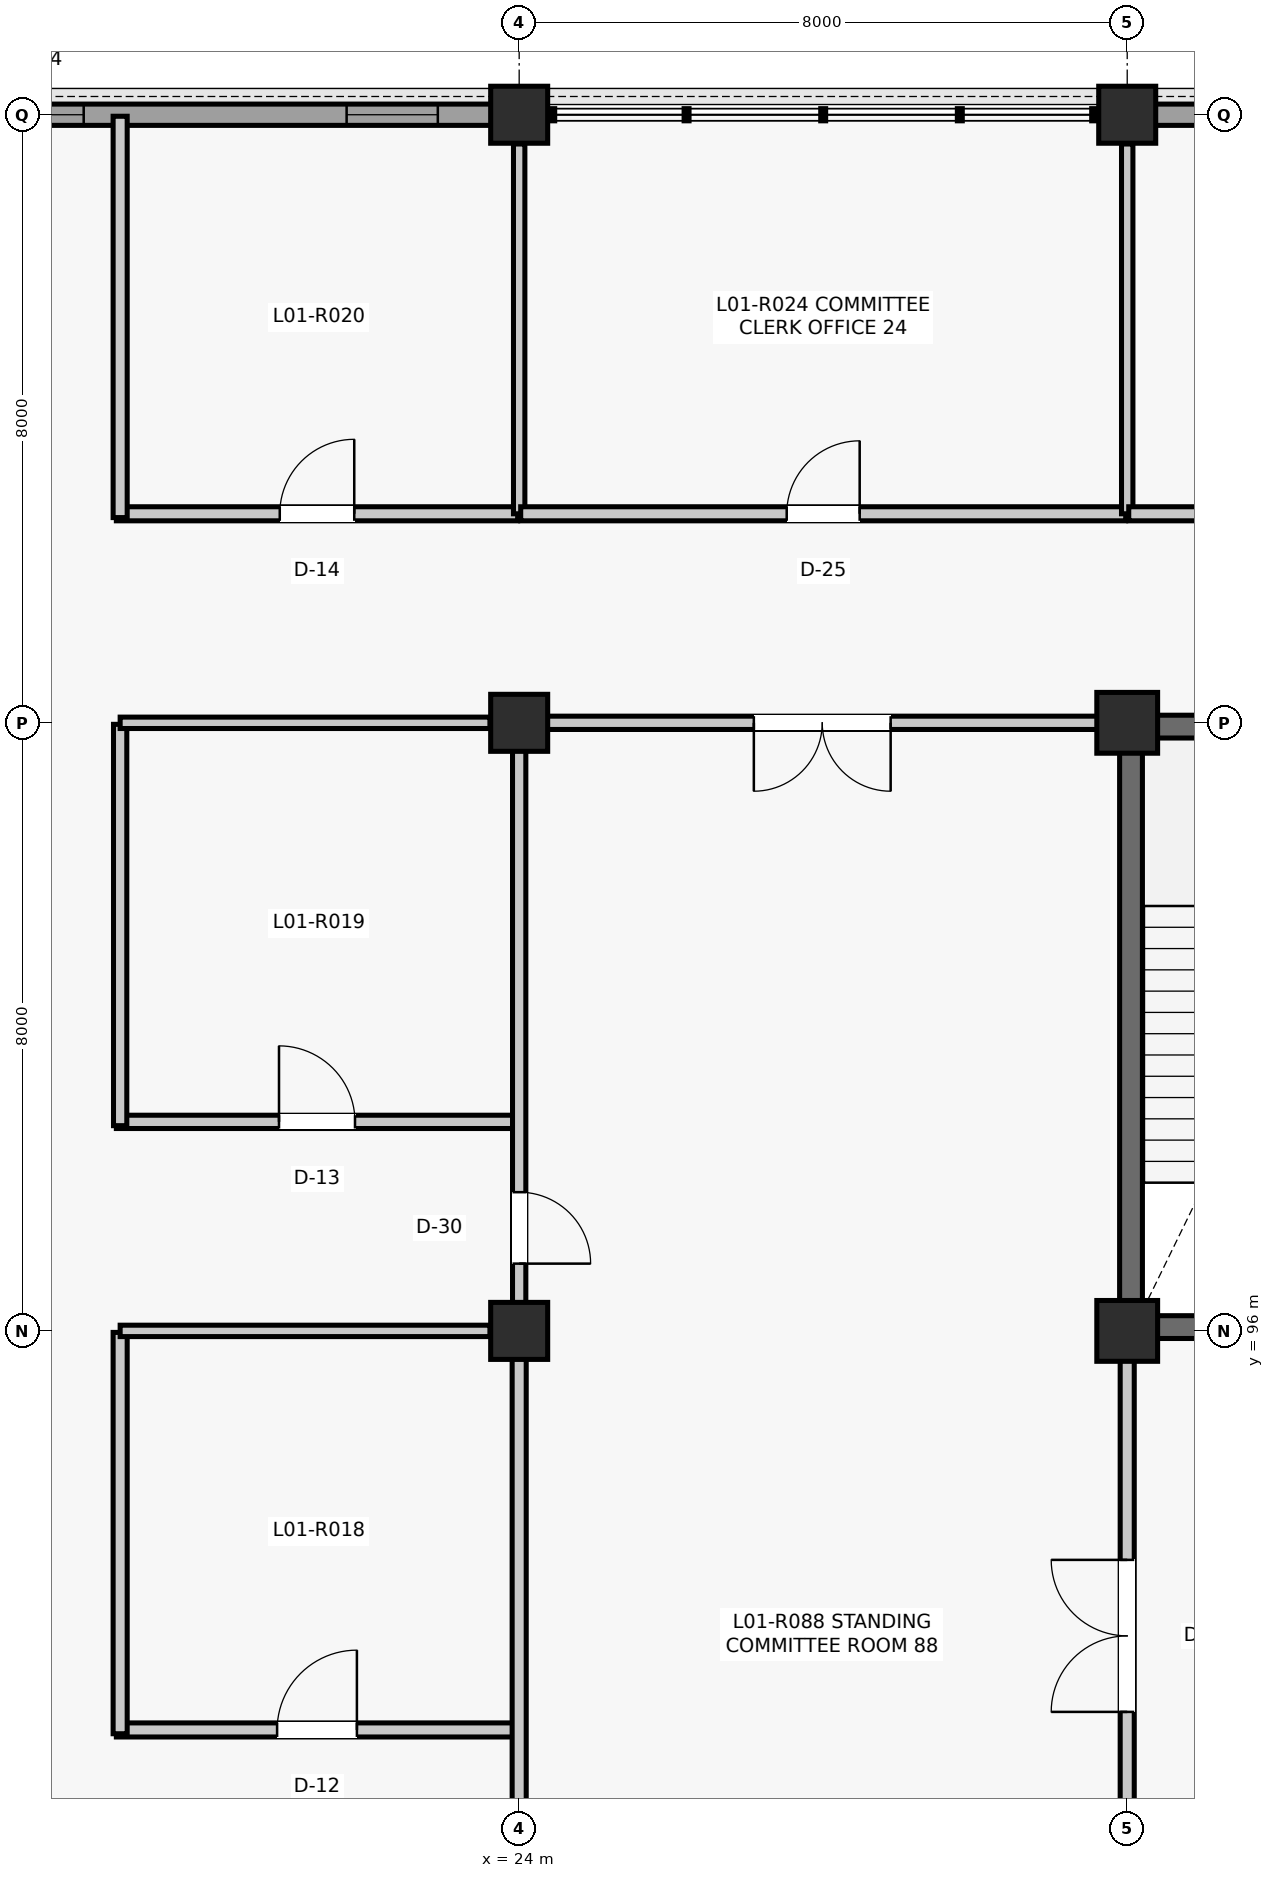
"""IFC4 building model, lengths in metres.
Left out: names, types, materials, properties, quantities, classifications, styles, units other than length and angle.
Written with IfcOpenShell. Run it as: python <this file> out.ifc"""

import sys

from ifc_helpers import new_model, si_unit, direction, frame, frame_2d, origin, origin_2d, place, context, subcontext, project, spatial, rectangle, extrude, element, fill, save


model = new_model("IFC4")
c1 = context("Model", 3, precision=1e-05, world=origin(), true_north=direction((0.0, 1.0)))
c2 = subcontext(c1, "Body", "Model", "MODEL_VIEW")
j1 = project(units=[si_unit("LENGTHUNIT", "METRE"), si_unit("PLANEANGLEUNIT", "RADIAN")], contexts=[c1])
p1 = place(None, origin())
s1 = spatial("IfcSite", under=j1, at=p1, CompositionType="ELEMENT")
p2 = place(p1, origin())
s2 = spatial("IfcBuilding", under=s1, at=p2, CompositionType="ELEMENT")
p3 = place(p2, frame((0.0, 0.0, 5.28)))
s3 = spatial("IfcBuildingStorey", under=s2, at=p3, CompositionType="ELEMENT", Elevation=5.28)
for number, where, z_axis, x_axis in (
    (1, (24.0, 96.0, 0.0), (0.0, 0.0, 1.0), (1.0, 0.0, 0.0)),
    (2, (24.0, 104.0, 0.0), (0.0, 0.0, 1.0), (1.0, 0.0, 0.0)),
    (3, (24.0, 112.0, 0.0), (0.0, 0.0, 1.0), (1.0, 0.0, 0.0)),
):
    element("IfcColumn", number, at=place(p3, frame(where, z_axis=z_axis, x_axis=x_axis)), inside=s3, PredefinedType="COLUMN", context=c2, shape_type="SweptSolid", body=[
        extrude(rectangle(XDim=0.75, YDim=0.75, at=origin_2d()), origin(), (0.0, 0.0, 1.0), 4.62),
    ])
for number, where, z_axis, x_axis in (
    (4, (32.0, 96.0, 0.0), (0.0, 0.0, 1.0), (1.0, 0.0, 0.0)),
    (5, (32.0, 104.0, 0.0), (0.0, 0.0, 1.0), (1.0, 0.0, 0.0)),
):
    element("IfcColumn", number, at=place(p3, frame(where, z_axis=z_axis, x_axis=x_axis)), inside=s3, PredefinedType="COLUMN", context=c2, shape_type="SweptSolid", body=[
        extrude(rectangle(XDim=0.8, YDim=0.8, at=origin_2d()), origin(), (0.0, 0.0, 1.0), 4.62),
    ])
p4 = place(p3, frame((32.0, 112.0, 0.0), z_axis=(0.0, 0.0, 1.0), x_axis=(1.0, 0.0, 0.0)))
e6 = element("IfcColumn", 6, at=p4, inside=s3, PredefinedType="COLUMN", context=c2, shape_type="SweptSolid", body=[
    extrude(rectangle(XDim=0.75, YDim=0.75, at=origin_2d()), origin(), (0.0, 0.0, 1.0), 4.62),
])
p5 = place(p3, frame((16.36, 112.0, 0.0), z_axis=(0.0, 0.0, 1.0), x_axis=(1.0, 0.0, 0.0)))
e7 = element("IfcWall", 7, at=p5, inside=s3, PredefinedType="SOLIDWALL", context=c2, shape_type="SweptSolid", body=[
    extrude(rectangle(XDim=7.28, YDim=0.28, at=frame_2d((3.64, 0.0))), origin(), (0.0, 0.0, 1.0), 3.974),
])
p6 = place(p5, frame((0.71, 0.0, 0.95)))
e8 = element("IfcOpeningElement", 8, at=p6, cuts=e7, PredefinedType="OPENING", context=c2, shape_type="SweptSolid", body=[
    extrude(rectangle(XDim=1.2, YDim=1.8, at=frame_2d((0.6, 0.9))), frame((0.0, 0.15, 0.0), z_axis=(0.0, -1.0, 0.0), x_axis=(1.0, 0.0, 0.0)), (0.0, 0.0, 1.0), 0.3),
])
p7 = place(p5, frame((5.37, 0.0, 0.95)))
e9 = element("IfcOpeningElement", 9, at=p7, cuts=e7, PredefinedType="OPENING", context=c2, shape_type="SweptSolid", body=[
    extrude(rectangle(XDim=1.2, YDim=1.8, at=frame_2d((0.6, 0.9))), frame((0.0, 0.15, 0.0), z_axis=(0.0, -1.0, 0.0), x_axis=(1.0, 0.0, 0.0)), (0.0, 0.0, 1.0), 0.3),
])
p8 = place(p3, frame((32.36, 112.0, 0.0), z_axis=(0.0, 0.0, 1.0), x_axis=(1.0, 0.0, 0.0)))
e10 = element("IfcWall", 10, at=p8, inside=s3, PredefinedType="SOLIDWALL", context=c2, shape_type="SweptSolid", body=[
    extrude(rectangle(XDim=7.28, YDim=0.28, at=frame_2d((3.64, 0.0))), origin(), (0.0, 0.0, 1.0), 4.022),
])
p9 = place(p8, frame((2.59, 0.0, 0.9)))
e11 = element("IfcOpeningElement", 11, at=p9, cuts=e10, PredefinedType="OPENING", context=c2, shape_type="SweptSolid", body=[
    extrude(rectangle(XDim=2.1, YDim=2.4, at=frame_2d((1.05, 1.2))), frame((0.0, 0.15, 0.0), z_axis=(0.0, -1.0, 0.0), x_axis=(1.0, 0.0, 0.0)), (0.0, 0.0, 1.0), 0.3),
])
for number, where, z_axis, x_axis in (
    (12, (32.05, 96.29, 0.0), (0.0, 0.0, 1.0), (0.0, 1.0, 0.0)),
    (13, (32.29, 103.95, 0.0), (0.0, 0.0, 1.0), (1.0, 0.0, 0.0)),
):
    element("IfcWall", number, at=place(p3, frame(where, z_axis=z_axis, x_axis=x_axis)), inside=s3, PredefinedType="SHEAR", context=c2, shape_type="SweptSolid", body=[
        extrude(rectangle(XDim=7.42, YDim=0.3, at=frame_2d((3.71, 0.0))), origin(), (0.0, 0.0, 1.0), 4.335),
    ])
p10 = place(p3, frame((32.29, 96.05, 0.0), z_axis=(0.0, 0.0, 1.0), x_axis=(1.0, 0.0, 0.0)))
e14 = element("IfcWall", 14, at=p10, inside=s3, PredefinedType="SHEAR", context=c2, shape_type="SweptSolid", body=[
    extrude(rectangle(XDim=3.86, YDim=0.3, at=frame_2d((1.93, 0.0))), origin(), (0.0, 0.0, 1.0), 4.335),
])
p11 = place(p3, frame((18.7, 90.75, 0.0), z_axis=(0.0, 0.0, 1.0), x_axis=(1.0, 0.0, 0.0)))
e15 = element("IfcWall", 15, at=p11, inside=s3, PredefinedType="PARTITIONING", context=c2, shape_type="SweptSolid", body=[
    extrude(rectangle(XDim=5.28, YDim=0.185, at=frame_2d((2.64, 0.0))), origin(), (0.0, 0.0, 1.0), 3.781),
])
p12 = place(p11, frame((2.115, 0.0, 0.0)))
e16 = element("IfcOpeningElement", 16, at=p12, cuts=e15, PredefinedType="OPENING", context=c2, shape_type="SweptSolid", body=[
    extrude(rectangle(XDim=1.05, YDim=2.15, at=frame_2d((0.525, 1.075))), frame((0.0, 0.103, 0.0), z_axis=(0.0, -1.0, 0.0), x_axis=(1.0, 0.0, 0.0)), (0.0, 0.0, 1.0), 0.205),
])
p13 = place(p3, frame((18.75, 90.7, 0.0), z_axis=(0.0, 0.0, 1.0), x_axis=(0.0, 1.0, 0.0)))
e17 = element("IfcWall", 17, at=p13, inside=s3, PredefinedType="PARTITIONING", context=c2, shape_type="SweptSolid", body=[
    extrude(rectangle(XDim=5.28, YDim=0.185, at=frame_2d((2.64, 0.0))), origin(), (0.0, 0.0, 1.0), 3.771),
])
p14 = place(p3, frame((18.75, 96.0, 0.0), z_axis=(0.0, 0.0, 1.0), x_axis=(1.0, 0.0, 0.0)))
e18 = element("IfcWall", 18, at=p14, inside=s3, PredefinedType="PARTITIONING", context=c2, shape_type="SweptSolid", body=[
    extrude(rectangle(XDim=4.865, YDim=0.15, at=frame_2d((2.433, 0.0))), origin(), (0.0, 0.0, 1.0), 3.771),
])
p15 = place(p3, frame((18.7, 98.75, 0.0), z_axis=(0.0, 0.0, 1.0), x_axis=(1.0, 0.0, 0.0)))
e19 = element("IfcWall", 19, at=p15, inside=s3, PredefinedType="PARTITIONING", context=c2, shape_type="SweptSolid", body=[
    extrude(rectangle(XDim=5.28, YDim=0.175, at=frame_2d((2.64, 0.0))), origin(), (0.0, 0.0, 1.0), 3.851),
])
p16 = place(p15, frame((2.14, 0.0, 0.0)))
e20 = element("IfcOpeningElement", 20, at=p16, cuts=e19, PredefinedType="OPENING", context=c2, shape_type="SweptSolid", body=[
    extrude(rectangle(XDim=1.0, YDim=2.15, at=frame_2d((0.5, 1.075))), frame((0.0, 0.097, 0.0), z_axis=(0.0, -1.0, 0.0), x_axis=(1.0, 0.0, 0.0)), (0.0, 0.0, 1.0), 0.195),
])
p17 = place(p3, frame((18.75, 98.7, 0.0), z_axis=(0.0, 0.0, 1.0), x_axis=(0.0, 1.0, 0.0)))
e21 = element("IfcWall", 21, at=p17, inside=s3, PredefinedType="PARTITIONING", context=c2, shape_type="SweptSolid", body=[
    extrude(rectangle(XDim=5.28, YDim=0.175, at=frame_2d((2.64, 0.0))), origin(), (0.0, 0.0, 1.0), 3.781),
])
p18 = place(p3, frame((18.75, 104.0, 0.0), z_axis=(0.0, 0.0, 1.0), x_axis=(1.0, 0.0, 0.0)))
e22 = element("IfcWall", 22, at=p18, inside=s3, PredefinedType="PARTITIONING", context=c2, shape_type="SweptSolid", body=[
    extrude(rectangle(XDim=4.865, YDim=0.15, at=frame_2d((2.433, 0.0))), origin(), (0.0, 0.0, 1.0), 3.781),
])
p19 = place(p3, frame((18.7, 106.75, 0.0), z_axis=(0.0, 0.0, 1.0), x_axis=(1.0, 0.0, 0.0)))
e23 = element("IfcWall", 23, at=p19, inside=s3, PredefinedType="PARTITIONING", context=c2, shape_type="SweptSolid", body=[
    extrude(rectangle(XDim=5.28, YDim=0.185, at=frame_2d((2.64, 0.0))), origin(), (0.0, 0.0, 1.0), 3.787),
])
p20 = place(p19, frame((2.15, 0.0, 0.0)))
e24 = element("IfcOpeningElement", 24, at=p20, cuts=e23, PredefinedType="OPENING", context=c2, shape_type="SweptSolid", body=[
    extrude(rectangle(XDim=0.98, YDim=2.15, at=frame_2d((0.49, 1.075))), frame((0.0, 0.103, 0.0), z_axis=(0.0, -1.0, 0.0), x_axis=(1.0, 0.0, 0.0)), (0.0, 0.0, 1.0), 0.205),
])
p21 = place(p3, frame((18.75, 106.7, 0.0), z_axis=(0.0, 0.0, 1.0), x_axis=(0.0, 1.0, 0.0)))
e25 = element("IfcWall", 25, at=p21, inside=s3, PredefinedType="PARTITIONING", context=c2, shape_type="SweptSolid", body=[
    extrude(rectangle(XDim=5.28, YDim=0.185, at=frame_2d((2.64, 0.0))), origin(), (0.0, 0.0, 1.0), 3.967),
])
p22 = place(p3, frame((24.0, 106.75, 0.0), z_axis=(0.0, 0.0, 1.0), x_axis=(0.0, 1.0, 0.0)))
e26 = element("IfcWall", 26, at=p22, inside=s3, PredefinedType="PARTITIONING", context=c2, shape_type="SweptSolid", body=[
    extrude(rectangle(XDim=4.865, YDim=0.15, at=frame_2d((2.433, 0.0))), origin(), (0.0, 0.0, 1.0), 3.787),
])
p23 = place(p3, frame((24.02, 106.75, 0.0), z_axis=(0.0, 0.0, 1.0), x_axis=(1.0, 0.0, 0.0)))
e27 = element("IfcWall", 27, at=p23, inside=s3, PredefinedType="PARTITIONING", context=c2, shape_type="SweptSolid", body=[
    extrude(rectangle(XDim=7.96, YDim=0.185, at=frame_2d((3.98, 0.0))), origin(), (0.0, 0.0, 1.0), 3.787),
])
p24 = place(p23, frame((3.5, 0.0, 0.0)))
e28 = element("IfcOpeningElement", 28, at=p24, cuts=e27, PredefinedType="OPENING", context=c2, shape_type="SweptSolid", body=[
    extrude(rectangle(XDim=0.96, YDim=2.14, at=frame_2d((0.48, 1.07))), frame((0.0, 0.103, 0.0), z_axis=(0.0, -1.0, 0.0), x_axis=(1.0, 0.0, 0.0)), (0.0, 0.0, 1.0), 0.205),
])
p25 = place(p3, frame((32.0, 106.75, 0.0), z_axis=(0.0, 0.0, 1.0), x_axis=(0.0, 1.0, 0.0)))
e29 = element("IfcWall", 29, at=p25, inside=s3, PredefinedType="PARTITIONING", context=c2, shape_type="SweptSolid", body=[
    extrude(rectangle(XDim=4.865, YDim=0.15, at=frame_2d((2.433, 0.0))), origin(), (0.0, 0.0, 1.0), 3.902),
])
p26 = place(p3, frame((32.02, 106.75, 0.0), z_axis=(0.0, 0.0, 1.0), x_axis=(1.0, 0.0, 0.0)))
e30 = element("IfcWall", 30, at=p26, inside=s3, PredefinedType="PARTITIONING", context=c2, shape_type="SweptSolid", body=[
    extrude(rectangle(XDim=7.96, YDim=0.185, at=frame_2d((3.98, 0.0))), origin(), (0.0, 0.0, 1.0), 3.781),
])
p27 = place(p26, frame((3.49, 0.0, 0.0)))
e31 = element("IfcOpeningElement", 31, at=p27, cuts=e30, PredefinedType="OPENING", context=c2, shape_type="SweptSolid", body=[
    extrude(rectangle(XDim=0.98, YDim=2.15, at=frame_2d((0.49, 1.075))), frame((0.0, 0.103, 0.0), z_axis=(0.0, -1.0, 0.0), x_axis=(1.0, 0.0, 0.0)), (0.0, 0.0, 1.0), 0.205),
])
p28 = place(p3, frame((24.0, 88.365, 0.0), z_axis=(0.0, 0.0, 1.0), x_axis=(0.0, 1.0, 0.0)))
e32 = element("IfcWall", 32, at=p28, inside=s3, PredefinedType="PARTITIONING", context=c2, shape_type="SweptSolid", body=[
    extrude(rectangle(XDim=7.27, YDim=0.185, at=frame_2d((3.635, 0.0))), origin(), (0.0, 0.0, 1.0), 3.781),
])
p29 = place(p28, frame((0.52, 0.0, 0.0)))
e33 = element("IfcOpeningElement", 33, at=p29, cuts=e32, PredefinedType="OPENING", context=c2, shape_type="SweptSolid", body=[
    extrude(rectangle(XDim=0.94, YDim=2.12, at=frame_2d((0.47, 1.06))), frame((0.0, 0.103, 0.0), z_axis=(0.0, -1.0, 0.0), x_axis=(1.0, 0.0, 0.0)), (0.0, 0.0, 1.0), 0.205),
])
p30 = place(p3, frame((24.0, 96.365, 0.0), z_axis=(0.0, 0.0, 1.0), x_axis=(0.0, 1.0, 0.0)))
e34 = element("IfcWall", 34, at=p30, inside=s3, PredefinedType="PARTITIONING", context=c2, shape_type="SweptSolid", body=[
    extrude(rectangle(XDim=7.27, YDim=0.175, at=frame_2d((3.635, 0.0))), origin(), (0.0, 0.0, 1.0), 3.851),
])
p31 = place(p30, frame((0.52, 0.0, 0.0)))
e35 = element("IfcOpeningElement", 35, at=p31, cuts=e34, PredefinedType="OPENING", context=c2, shape_type="SweptSolid", body=[
    extrude(rectangle(XDim=0.94, YDim=2.12, at=frame_2d((0.47, 1.06))), frame((0.0, 0.097, 0.0), z_axis=(0.0, -1.0, 0.0), x_axis=(1.0, 0.0, 0.0)), (0.0, 0.0, 1.0), 0.195),
])
p32 = place(p3, frame((32.0, 88.365, 0.0), z_axis=(0.0, 0.0, 1.0), x_axis=(0.0, 1.0, 0.0)))
e36 = element("IfcWall", 36, at=p32, inside=s3, PredefinedType="PARTITIONING", context=c2, shape_type="SweptSolid", body=[
    extrude(rectangle(XDim=7.245, YDim=0.185, at=frame_2d((3.623, 0.0))), origin(), (0.0, 0.0, 1.0), 3.851),
])
p33 = place(p32, frame((2.623, 0.0, 0.0)))
e37 = element("IfcOpeningElement", 37, at=p33, cuts=e36, PredefinedType="OPENING", context=c2, shape_type="SweptSolid", body=[
    extrude(rectangle(XDim=2.0, YDim=2.4, at=frame_2d((1.0, 1.2))), frame((0.0, 0.103, 0.0), z_axis=(0.0, -1.0, 0.0), x_axis=(1.0, 0.0, 0.0)), (0.0, 0.0, 1.0), 0.205),
])
p34 = place(p3, frame((24.365, 104.0, 0.0), z_axis=(0.0, 0.0, 1.0), x_axis=(1.0, 0.0, 0.0)))
e38 = element("IfcWall", 38, at=p34, inside=s3, PredefinedType="PARTITIONING", context=c2, shape_type="SweptSolid", body=[
    extrude(rectangle(XDim=7.245, YDim=0.175, at=frame_2d((3.623, 0.0))), origin(), (0.0, 0.0, 1.0), 3.712),
])
p35 = place(p34, frame((2.722, 0.0, 0.0)))
e39 = element("IfcOpeningElement", 39, at=p35, cuts=e38, PredefinedType="OPENING", context=c2, shape_type="SweptSolid", body=[
    extrude(rectangle(XDim=1.8, YDim=2.35, at=frame_2d((0.9, 1.175))), frame((0.0, 0.097, 0.0), z_axis=(0.0, -1.0, 0.0), x_axis=(1.0, 0.0, 0.0)), (0.0, 0.0, 1.0), 0.195),
])
p36 = place(p6, origin())
e40 = element("IfcWindow", 40, at=p36, inside=s3, PartitioningType="SINGLE_PANEL", PredefinedType="WINDOW", context=c2, shape_type="SweptSolid", body=[
    extrude(rectangle(XDim=1.2, YDim=1.8, at=frame_2d((0.6, 0.9))), frame((0.0, 0.03, 0.0), z_axis=(0.0, -1.0, 0.0), x_axis=(1.0, 0.0, 0.0)), (0.0, 0.0, 1.0), 0.06),
])
fill(e8, e40)
p37 = place(p7, origin())
e41 = element("IfcWindow", 41, at=p37, inside=s3, PartitioningType="SINGLE_PANEL", PredefinedType="WINDOW", context=c2, shape_type="SweptSolid", body=[
    extrude(rectangle(XDim=1.2, YDim=1.8, at=frame_2d((0.6, 0.9))), frame((0.0, 0.03, 0.0), z_axis=(0.0, -1.0, 0.0), x_axis=(1.0, 0.0, 0.0)), (0.0, 0.0, 1.0), 0.06),
])
fill(e9, e41)
p38 = place(p12, origin())
e42 = element("IfcDoor", 42, at=p38, inside=s3, OperationType="SINGLE_SWING_RIGHT", PredefinedType="DOOR", context=c2, shape_type="SweptSolid", body=[
    extrude(rectangle(XDim=1.05, YDim=2.15, at=frame_2d((0.525, 1.075))), frame((0.0, 0.025, 0.0), z_axis=(0.0, -1.0, 0.0), x_axis=(1.0, 0.0, 0.0)), (0.0, 0.0, 1.0), 0.05),
])
fill(e16, e42)
p39 = place(p16, origin())
e43 = element("IfcDoor", 43, at=p39, inside=s3, OperationType="SINGLE_SWING_LEFT", PredefinedType="DOOR", context=c2, shape_type="SweptSolid", body=[
    extrude(rectangle(XDim=1.0, YDim=2.15, at=frame_2d((0.5, 1.075))), frame((0.0, 0.025, 0.0), z_axis=(0.0, -1.0, 0.0), x_axis=(1.0, 0.0, 0.0)), (0.0, 0.0, 1.0), 0.05),
])
fill(e20, e43)
p40 = place(p20, origin())
e44 = element("IfcDoor", 44, at=p40, inside=s3, OperationType="SINGLE_SWING_RIGHT", PredefinedType="DOOR", context=c2, shape_type="SweptSolid", body=[
    extrude(rectangle(XDim=0.98, YDim=2.15, at=frame_2d((0.49, 1.075))), frame((0.0, 0.025, 0.0), z_axis=(0.0, -1.0, 0.0), x_axis=(1.0, 0.0, 0.0)), (0.0, 0.0, 1.0), 0.05),
])
fill(e24, e44)
p41 = place(p24, origin())
e45 = element("IfcDoor", 45, at=p41, inside=s3, OperationType="SINGLE_SWING_RIGHT", PredefinedType="DOOR", context=c2, shape_type="SweptSolid", body=[
    extrude(rectangle(XDim=0.96, YDim=2.14, at=frame_2d((0.48, 1.07))), frame((0.0, 0.025, 0.0), z_axis=(0.0, -1.0, 0.0), x_axis=(1.0, 0.0, 0.0)), (0.0, 0.0, 1.0), 0.05),
])
fill(e28, e45)
p42 = place(p31, frame((0.94, 0.0, 0.0), z_axis=(0.0, 0.0, 1.0), x_axis=(-1.0, 0.0, 0.0)))
e46 = element("IfcDoor", 46, at=p42, inside=s3, OperationType="SINGLE_SWING_LEFT", PredefinedType="DOOR", context=c2, shape_type="SweptSolid", body=[
    extrude(rectangle(XDim=0.94, YDim=2.12, at=frame_2d((0.47, 1.06))), frame((0.0, 0.025, 0.0), z_axis=(0.0, -1.0, 0.0), x_axis=(1.0, 0.0, 0.0)), (0.0, 0.0, 1.0), 0.05),
])
fill(e35, e46)
p43 = place(p33, origin())
e47 = element("IfcDoor", 47, at=p43, inside=s3, OperationType="DOUBLE_DOOR_SINGLE_SWING", PredefinedType="DOOR", context=c2, shape_type="SweptSolid", body=[
    extrude(rectangle(XDim=2.0, YDim=2.4, at=frame_2d((1.0, 1.2))), frame((0.0, 0.025, 0.0), z_axis=(0.0, -1.0, 0.0), x_axis=(1.0, 0.0, 0.0)), (0.0, 0.0, 1.0), 0.05),
])
fill(e37, e47)
p44 = place(p35, frame((1.8, 0.0, 0.0), z_axis=(0.0, 0.0, 1.0), x_axis=(-1.0, 0.0, 0.0)))
e48 = element("IfcDoor", 48, at=p44, inside=s3, OperationType="DOUBLE_DOOR_SINGLE_SWING", PredefinedType="DOOR", context=c2, shape_type="SweptSolid", body=[
    extrude(rectangle(XDim=1.8, YDim=2.35, at=frame_2d((0.9, 1.175))), frame((0.0, 0.025, 0.0), z_axis=(0.0, -1.0, 0.0), x_axis=(1.0, 0.0, 0.0)), (0.0, 0.0, 1.0), 0.05),
])
fill(e39, e48)
save(model, sys.argv[1])
